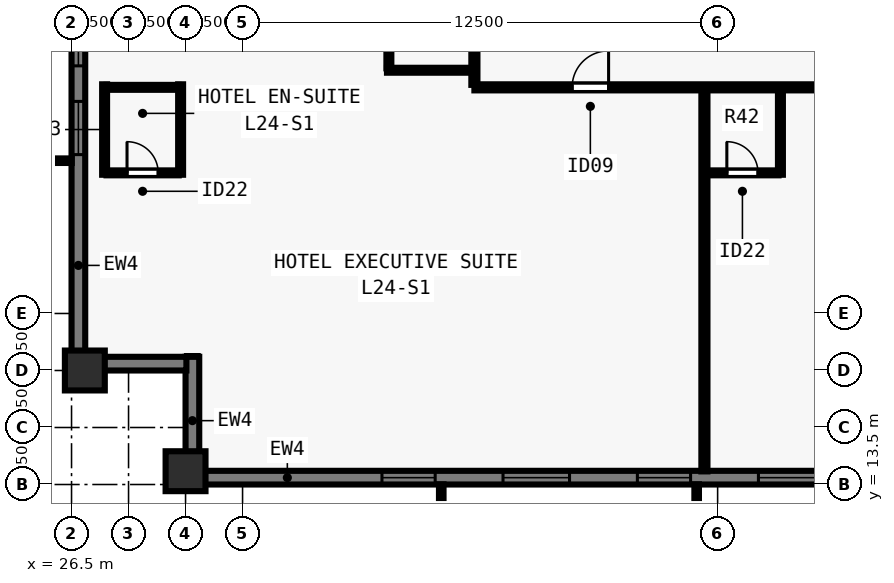
"""IFC4 building model, lengths in metres.
Left out: names, types, materials, properties, quantities, classifications, styles, units other than length and angle.
Written with IfcOpenShell. Run it as: python <this file> out.ifc"""

import sys

from ifc_helpers import new_model, si_unit, direction, frame, frame_2d, origin, origin_2d, place, context, subcontext, project, spatial, rectangle, extrude, element, fill, save


model = new_model("IFC4")
c1 = context("Model", 3, precision=1e-05, world=origin(), true_north=direction((0.0, 1.0)))
c2 = subcontext(c1, "Body", "Model", "MODEL_VIEW")
j1 = project(units=[si_unit("LENGTHUNIT", "METRE"), si_unit("PLANEANGLEUNIT", "RADIAN")], contexts=[c1])
p1 = place(None, origin())
s1 = spatial("IfcSite", under=j1, at=p1, CompositionType="ELEMENT")
p2 = place(p1, origin())
s2 = spatial("IfcBuilding", under=s1, at=p2, CompositionType="ELEMENT")
p3 = place(p2, frame((0.0, 0.0, 90.0)))
s3 = spatial("IfcBuildingStorey", under=s2, at=p3, CompositionType="ELEMENT", Elevation=90.0)
for number, where, z_axis, x_axis in (
    (1, (29.5, 13.85, 0.0), (0.0, 0.0, 1.0), (1.0, 0.0, 0.0)),
    (2, (26.85, 16.5, 0.0), (0.0, 0.0, 1.0), (0.0, 1.0, 0.0)),
):
    element("IfcColumn", number, at=place(p3, frame(where, z_axis=z_axis, x_axis=x_axis)), inside=s3, PredefinedType="COLUMN", context=c2, shape_type="SweptSolid", body=[
        extrude(rectangle(XDim=1.05, YDim=1.05, at=origin_2d()), origin(), (0.0, 0.0, 1.0), 3.5),
    ])
p4 = place(p3, frame((74.5, 13.68, 0.0), z_axis=(0.0, 0.0, 1.0), x_axis=(-1.0, 0.0, 0.0)))
e3 = element("IfcWall", 3, at=p4, inside=s3, PredefinedType="SOLIDWALL", context=c2, shape_type="SweptSolid", body=[
    extrude(rectangle(XDim=44.662, YDim=0.36, at=frame_2d((22.331, 0.0))), origin(), (0.0, 0.0, 1.0), 3.28),
])
p5 = place(p4, frame((4.83, 0.0, 0.8)))
e4 = element("IfcOpeningElement", 4, at=p5, cuts=e3, PredefinedType="OPENING", context=c2, shape_type="SweptSolid", body=[
    extrude(rectangle(XDim=1.4, YDim=1.544, at=frame_2d((0.7, 0.772))), frame((0.0, 0.19, 0.0), z_axis=(0.0, -1.0, 0.0), x_axis=(1.0, 0.0, 0.0)), (0.0, 0.0, 1.0), 0.38),
])
p6 = place(p4, frame((8.015, 0.0, 0.8)))
e5 = element("IfcOpeningElement", 5, at=p6, cuts=e3, PredefinedType="OPENING", context=c2, shape_type="SweptSolid", body=[
    extrude(rectangle(XDim=1.75, YDim=1.544, at=frame_2d((0.875, 0.772))), frame((0.0, 0.19, 0.0), z_axis=(0.0, -1.0, 0.0), x_axis=(1.0, 0.0, 0.0)), (0.0, 0.0, 1.0), 0.38),
])
p7 = place(p4, frame((11.551, 0.0, 0.8)))
e6 = element("IfcOpeningElement", 6, at=p7, cuts=e3, PredefinedType="OPENING", context=c2, shape_type="SweptSolid", body=[
    extrude(rectangle(XDim=1.4, YDim=1.544, at=frame_2d((0.7, 0.772))), frame((0.0, 0.19, 0.0), z_axis=(0.0, -1.0, 0.0), x_axis=(1.0, 0.0, 0.0)), (0.0, 0.0, 1.0), 0.38),
])
p8 = place(p4, frame((14.736, 0.0, 0.8)))
e7 = element("IfcOpeningElement", 7, at=p8, cuts=e3, PredefinedType="OPENING", context=c2, shape_type="SweptSolid", body=[
    extrude(rectangle(XDim=1.75, YDim=1.544, at=frame_2d((0.875, 0.772))), frame((0.0, 0.19, 0.0), z_axis=(0.0, -1.0, 0.0), x_axis=(1.0, 0.0, 0.0)), (0.0, 0.0, 1.0), 0.38),
])
p9 = place(p4, frame((18.721, 0.0, 0.8)))
e8 = element("IfcOpeningElement", 8, at=p9, cuts=e3, PredefinedType="OPENING", context=c2, shape_type="SweptSolid", body=[
    extrude(rectangle(XDim=1.4, YDim=1.544, at=frame_2d((0.7, 0.772))), frame((0.0, 0.19, 0.0), z_axis=(0.0, -1.0, 0.0), x_axis=(1.0, 0.0, 0.0)), (0.0, 0.0, 1.0), 0.38),
])
p10 = place(p4, frame((21.456, 0.0, 0.8)))
e9 = element("IfcOpeningElement", 9, at=p10, cuts=e3, PredefinedType="OPENING", context=c2, shape_type="SweptSolid", body=[
    extrude(rectangle(XDim=1.75, YDim=1.544, at=frame_2d((0.875, 0.772))), frame((0.0, 0.19, 0.0), z_axis=(0.0, -1.0, 0.0), x_axis=(1.0, 0.0, 0.0)), (0.0, 0.0, 1.0), 0.38),
])
p11 = place(p4, frame((24.991, 0.0, 0.8)))
e10 = element("IfcOpeningElement", 10, at=p11, cuts=e3, PredefinedType="OPENING", context=c2, shape_type="SweptSolid", body=[
    extrude(rectangle(XDim=1.4, YDim=1.544, at=frame_2d((0.7, 0.772))), frame((0.0, 0.19, 0.0), z_axis=(0.0, -1.0, 0.0), x_axis=(1.0, 0.0, 0.0)), (0.0, 0.0, 1.0), 0.38),
])
p12 = place(p4, frame((28.177, 0.0, 0.8)))
e11 = element("IfcOpeningElement", 11, at=p12, cuts=e3, PredefinedType="OPENING", context=c2, shape_type="SweptSolid", body=[
    extrude(rectangle(XDim=1.75, YDim=1.544, at=frame_2d((0.875, 0.772))), frame((0.0, 0.19, 0.0), z_axis=(0.0, -1.0, 0.0), x_axis=(1.0, 0.0, 0.0)), (0.0, 0.0, 1.0), 0.38),
])
p13 = place(p4, frame((31.711, 0.0, 0.8)))
e12 = element("IfcOpeningElement", 12, at=p13, cuts=e3, PredefinedType="OPENING", context=c2, shape_type="SweptSolid", body=[
    extrude(rectangle(XDim=1.4, YDim=1.544, at=frame_2d((0.7, 0.772))), frame((0.0, 0.19, 0.0), z_axis=(0.0, -1.0, 0.0), x_axis=(1.0, 0.0, 0.0)), (0.0, 0.0, 1.0), 0.38),
])
p14 = place(p4, frame((34.897, 0.0, 0.8)))
e13 = element("IfcOpeningElement", 13, at=p14, cuts=e3, PredefinedType="OPENING", context=c2, shape_type="SweptSolid", body=[
    extrude(rectangle(XDim=1.75, YDim=1.544, at=frame_2d((0.875, 0.772))), frame((0.0, 0.19, 0.0), z_axis=(0.0, -1.0, 0.0), x_axis=(1.0, 0.0, 0.0)), (0.0, 0.0, 1.0), 0.38),
])
p15 = place(p4, frame((38.432, 0.0, 0.8)))
e14 = element("IfcOpeningElement", 14, at=p15, cuts=e3, PredefinedType="OPENING", context=c2, shape_type="SweptSolid", body=[
    extrude(rectangle(XDim=1.4, YDim=1.544, at=frame_2d((0.7, 0.772))), frame((0.0, 0.19, 0.0), z_axis=(0.0, -1.0, 0.0), x_axis=(1.0, 0.0, 0.0)), (0.0, 0.0, 1.0), 0.38),
])
p16 = place(p3, frame((29.68, 13.5, 0.0), z_axis=(0.0, 0.0, 1.0), x_axis=(0.0, 1.0, 0.0)))
e15 = element("IfcWall", 15, at=p16, inside=s3, PredefinedType="SOLIDWALL", context=c2, shape_type="SweptSolid", body=[
    extrude(rectangle(XDim=3.36, YDim=0.36, at=frame_2d((1.68, 0.0))), origin(), (0.0, 0.0, 1.0), 3.28),
])
p17 = place(p3, frame((29.522, 16.68, 0.0), z_axis=(0.0, 0.0, 1.0), x_axis=(-1.0, 0.0, 0.0)))
e16 = element("IfcWall", 16, at=p17, inside=s3, PredefinedType="SOLIDWALL", context=c2, shape_type="SweptSolid", body=[
    extrude(rectangle(XDim=2.684, YDim=0.36, at=frame_2d((1.342, 0.0))), origin(), (0.0, 0.0, 1.0), 3.28),
])
p18 = place(p3, frame((26.68, 16.5, 0.0), z_axis=(0.0, 0.0, 1.0), x_axis=(0.0, 1.0, 0.0)))
e17 = element("IfcWall", 17, at=p18, inside=s3, PredefinedType="SOLIDWALL", context=c2, shape_type="SweptSolid", body=[
    extrude(rectangle(XDim=44.662, YDim=0.36, at=frame_2d((22.331, 0.0))), origin(), (0.0, 0.0, 1.0), 3.28),
])
p19 = place(p18, frame((5.68, 0.0, 0.8)))
e18 = element("IfcOpeningElement", 18, at=p19, cuts=e17, PredefinedType="OPENING", context=c2, shape_type="SweptSolid", body=[
    extrude(rectangle(XDim=1.4, YDim=1.544, at=frame_2d((0.7, 0.772))), frame((0.0, 0.19, 0.0), z_axis=(0.0, -1.0, 0.0), x_axis=(1.0, 0.0, 0.0)), (0.0, 0.0, 1.0), 0.38),
])
p20 = place(p18, frame((8.015, 0.0, 0.8)))
e19 = element("IfcOpeningElement", 19, at=p20, cuts=e17, PredefinedType="OPENING", context=c2, shape_type="SweptSolid", body=[
    extrude(rectangle(XDim=1.75, YDim=1.544, at=frame_2d((0.875, 0.772))), frame((0.0, 0.19, 0.0), z_axis=(0.0, -1.0, 0.0), x_axis=(1.0, 0.0, 0.0)), (0.0, 0.0, 1.0), 0.38),
])
p21 = place(p18, frame((11.551, 0.0, 0.8)))
e20 = element("IfcOpeningElement", 20, at=p21, cuts=e17, PredefinedType="OPENING", context=c2, shape_type="SweptSolid", body=[
    extrude(rectangle(XDim=1.4, YDim=1.544, at=frame_2d((0.7, 0.772))), frame((0.0, 0.19, 0.0), z_axis=(0.0, -1.0, 0.0), x_axis=(1.0, 0.0, 0.0)), (0.0, 0.0, 1.0), 0.38),
])
p22 = place(p18, frame((14.736, 0.0, 0.8)))
e21 = element("IfcOpeningElement", 21, at=p22, cuts=e17, PredefinedType="OPENING", context=c2, shape_type="SweptSolid", body=[
    extrude(rectangle(XDim=1.75, YDim=1.544, at=frame_2d((0.875, 0.772))), frame((0.0, 0.19, 0.0), z_axis=(0.0, -1.0, 0.0), x_axis=(1.0, 0.0, 0.0)), (0.0, 0.0, 1.0), 0.38),
])
p23 = place(p18, frame((18.721, 0.0, 0.8)))
e22 = element("IfcOpeningElement", 22, at=p23, cuts=e17, PredefinedType="OPENING", context=c2, shape_type="SweptSolid", body=[
    extrude(rectangle(XDim=1.4, YDim=1.544, at=frame_2d((0.7, 0.772))), frame((0.0, 0.19, 0.0), z_axis=(0.0, -1.0, 0.0), x_axis=(1.0, 0.0, 0.0)), (0.0, 0.0, 1.0), 0.38),
])
p24 = place(p18, frame((22.706, 0.0, 0.8)))
e23 = element("IfcOpeningElement", 23, at=p24, cuts=e17, PredefinedType="OPENING", context=c2, shape_type="SweptSolid", body=[
    extrude(rectangle(XDim=1.75, YDim=1.544, at=frame_2d((0.875, 0.772))), frame((0.0, 0.19, 0.0), z_axis=(0.0, -1.0, 0.0), x_axis=(1.0, 0.0, 0.0)), (0.0, 0.0, 1.0), 0.38),
])
p25 = place(p18, frame((24.991, 0.0, 0.8)))
e24 = element("IfcOpeningElement", 24, at=p25, cuts=e17, PredefinedType="OPENING", context=c2, shape_type="SweptSolid", body=[
    extrude(rectangle(XDim=1.4, YDim=1.544, at=frame_2d((0.7, 0.772))), frame((0.0, 0.19, 0.0), z_axis=(0.0, -1.0, 0.0), x_axis=(1.0, 0.0, 0.0)), (0.0, 0.0, 1.0), 0.38),
])
p26 = place(p18, frame((28.177, 0.0, 0.8)))
e25 = element("IfcOpeningElement", 25, at=p26, cuts=e17, PredefinedType="OPENING", context=c2, shape_type="SweptSolid", body=[
    extrude(rectangle(XDim=1.75, YDim=1.544, at=frame_2d((0.875, 0.772))), frame((0.0, 0.19, 0.0), z_axis=(0.0, -1.0, 0.0), x_axis=(1.0, 0.0, 0.0)), (0.0, 0.0, 1.0), 0.38),
])
p27 = place(p18, frame((31.711, 0.0, 0.8)))
e26 = element("IfcOpeningElement", 26, at=p27, cuts=e17, PredefinedType="OPENING", context=c2, shape_type="SweptSolid", body=[
    extrude(rectangle(XDim=1.4, YDim=1.544, at=frame_2d((0.7, 0.772))), frame((0.0, 0.19, 0.0), z_axis=(0.0, -1.0, 0.0), x_axis=(1.0, 0.0, 0.0)), (0.0, 0.0, 1.0), 0.38),
])
p28 = place(p18, frame((34.897, 0.0, 0.8)))
e27 = element("IfcOpeningElement", 27, at=p28, cuts=e17, PredefinedType="OPENING", context=c2, shape_type="SweptSolid", body=[
    extrude(rectangle(XDim=1.75, YDim=1.544, at=frame_2d((0.875, 0.772))), frame((0.0, 0.19, 0.0), z_axis=(0.0, -1.0, 0.0), x_axis=(1.0, 0.0, 0.0)), (0.0, 0.0, 1.0), 0.38),
])
p29 = place(p18, frame((37.982, 0.0, 0.8)))
e28 = element("IfcOpeningElement", 28, at=p29, cuts=e17, PredefinedType="OPENING", context=c2, shape_type="SweptSolid", body=[
    extrude(rectangle(XDim=1.4, YDim=1.544, at=frame_2d((0.7, 0.772))), frame((0.0, 0.19, 0.0), z_axis=(0.0, -1.0, 0.0), x_axis=(1.0, 0.0, 0.0)), (0.0, 0.0, 1.0), 0.38),
])
p30 = place(p3, frame((37.1, 23.95, 0.0), z_axis=(0.0, 0.0, 1.0), x_axis=(1.0, 0.0, 0.0)))
e29 = element("IfcWall", 29, at=p30, inside=s3, PredefinedType="PARTITIONING", context=c2, shape_type="SweptSolid", body=[
    extrude(rectangle(XDim=29.8, YDim=0.16, at=frame_2d((14.9, 0.0))), origin(), (0.0, 0.0, 1.0), 3.28),
])
p31 = place(p30, frame((2.571, 0.0, 0.0)))
e30 = element("IfcOpeningElement", 30, at=p31, cuts=e29, PredefinedType="OPENING", context=c2, shape_type="SweptSolid", body=[
    extrude(rectangle(XDim=0.96, YDim=2.15, at=frame_2d((0.48, 1.075))), frame((0.0, 0.09, 0.0), z_axis=(0.0, -1.0, 0.0), x_axis=(1.0, 0.0, 0.0)), (0.0, 0.0, 1.0), 0.18),
])
p32 = place(p30, frame((15.42, 0.0, 0.0)))
e31 = element("IfcOpeningElement", 31, at=p32, cuts=e29, PredefinedType="OPENING", context=c2, shape_type="SweptSolid", body=[
    extrude(rectangle(XDim=0.96, YDim=2.15, at=frame_2d((0.48, 1.075))), frame((0.0, 0.09, 0.0), z_axis=(0.0, -1.0, 0.0), x_axis=(1.0, 0.0, 0.0)), (0.0, 0.0, 1.0), 0.18),
])
p33 = place(p30, frame((27.269, 0.0, 0.0)))
e32 = element("IfcOpeningElement", 32, at=p33, cuts=e29, PredefinedType="OPENING", context=c2, shape_type="SweptSolid", body=[
    extrude(rectangle(XDim=0.96, YDim=2.15, at=frame_2d((0.48, 1.075))), frame((0.0, 0.09, 0.0), z_axis=(0.0, -1.0, 0.0), x_axis=(1.0, 0.0, 0.0)), (0.0, 0.0, 1.0), 0.18),
])
p34 = place(p3, frame((37.1, 24.015, 0.0), z_axis=(0.0, 0.0, 1.0), x_axis=(0.0, 1.0, 0.0)))
e33 = element("IfcWall", 33, at=p34, inside=s3, PredefinedType="PARTITIONING", context=c2, shape_type="SweptSolid", body=[
    extrude(rectangle(XDim=29.97, YDim=0.16, at=frame_2d((14.985, 0.0))), origin(), (0.0, 0.0, 1.0), 3.28),
])
p35 = place(p34, frame((8.134, 0.0, 0.0)))
e34 = element("IfcOpeningElement", 34, at=p35, cuts=e33, PredefinedType="OPENING", context=c2, shape_type="SweptSolid", body=[
    extrude(rectangle(XDim=0.96, YDim=2.15, at=frame_2d((0.48, 1.075))), frame((0.0, 0.09, 0.0), z_axis=(0.0, -1.0, 0.0), x_axis=(1.0, 0.0, 0.0)), (0.0, 0.0, 1.0), 0.18),
])
p36 = place(p34, frame((22.934, 0.0, 0.0)))
e35 = element("IfcOpeningElement", 35, at=p36, cuts=e33, PredefinedType="OPENING", context=c2, shape_type="SweptSolid", body=[
    extrude(rectangle(XDim=0.96, YDim=2.15, at=frame_2d((0.48, 1.075))), frame((0.0, 0.09, 0.0), z_axis=(0.0, -1.0, 0.0), x_axis=(1.0, 0.0, 0.0)), (0.0, 0.0, 1.0), 0.18),
])
for number, where, z_axis, x_axis in (
    (36, (27.37, 21.65, 0.0), (0.0, 0.0, 1.0), (0.0, 1.0, 0.0)),
    (37, (29.37, 21.65, 0.0), (0.0, 0.0, 1.0), (0.0, 1.0, 0.0)),
):
    element("IfcWall", number, at=place(p3, frame(where, z_axis=z_axis, x_axis=x_axis)), inside=s3, PredefinedType="PLUMBINGWALL", context=c2, shape_type="SweptSolid", body=[
        extrude(rectangle(XDim=2.38, YDim=0.13, at=frame_2d((1.19, 0.0))), origin(), (0.0, 0.0, 1.0), 3.28),
    ])
p37 = place(p3, frame((27.42, 21.7, 0.0), z_axis=(0.0, 0.0, 1.0), x_axis=(1.0, 0.0, 0.0)))
e38 = element("IfcWall", 38, at=p37, inside=s3, PredefinedType="PLUMBINGWALL", context=c2, shape_type="SweptSolid", body=[
    extrude(rectangle(XDim=1.9, YDim=0.13, at=frame_2d((0.95, 0.0))), origin(), (0.0, 0.0, 1.0), 3.28),
])
p38 = place(p37, frame((0.54, 0.0, 0.0)))
e39 = element("IfcOpeningElement", 39, at=p38, cuts=e38, PredefinedType="OPENING", context=c2, shape_type="SweptSolid", body=[
    extrude(rectangle(XDim=0.82, YDim=2.1, at=frame_2d((0.41, 1.05))), frame((0.0, 0.075, 0.0), z_axis=(0.0, -1.0, 0.0), x_axis=(1.0, 0.0, 0.0)), (0.0, 0.0, 1.0), 0.15),
])
p39 = place(p3, frame((27.42, 23.95, 0.0), z_axis=(0.0, 0.0, 1.0), x_axis=(1.0, 0.0, 0.0)))
e40 = element("IfcWall", 40, at=p39, inside=s3, PredefinedType="PLUMBINGWALL", context=c2, shape_type="SweptSolid", body=[
    extrude(rectangle(XDim=1.9, YDim=0.13, at=frame_2d((0.95, 0.0))), origin(), (0.0, 0.0, 1.0), 3.28),
])
p40 = place(p3, frame((43.153, 13.845, 0.0), z_axis=(0.0, 0.0, 1.0), x_axis=(0.0, 1.0, 0.0)))
e41 = element("IfcWall", 41, at=p40, inside=s3, PredefinedType="PARTITIONING", context=c2, shape_type="SweptSolid", body=[
    extrude(rectangle(XDim=10.04, YDim=0.16, at=frame_2d((5.02, 0.0))), origin(), (0.0, 0.0, 1.0), 3.28),
])
p41 = place(p3, frame((45.153, 21.65, 0.0), z_axis=(0.0, 0.0, 1.0), x_axis=(0.0, 1.0, 0.0)))
e42 = element("IfcWall", 42, at=p41, inside=s3, PredefinedType="PLUMBINGWALL", context=c2, shape_type="SweptSolid", body=[
    extrude(rectangle(XDim=2.235, YDim=0.13, at=frame_2d((1.118, 0.0))), origin(), (0.0, 0.0, 1.0), 3.28),
])
p42 = place(p3, frame((43.218, 21.7, 0.0), z_axis=(0.0, 0.0, 1.0), x_axis=(1.0, 0.0, 0.0)))
e43 = element("IfcWall", 43, at=p42, inside=s3, PredefinedType="PLUMBINGWALL", context=c2, shape_type="SweptSolid", body=[
    extrude(rectangle(XDim=1.885, YDim=0.13, at=frame_2d((0.942, 0.0))), origin(), (0.0, 0.0, 1.0), 3.28),
])
p43 = place(p42, frame((0.525, 0.0, 0.0)))
e44 = element("IfcOpeningElement", 44, at=p43, cuts=e43, PredefinedType="OPENING", context=c2, shape_type="SweptSolid", body=[
    extrude(rectangle(XDim=0.82, YDim=2.1, at=frame_2d((0.41, 1.05))), frame((0.0, 0.075, 0.0), z_axis=(0.0, -1.0, 0.0), x_axis=(1.0, 0.0, 0.0)), (0.0, 0.0, 1.0), 0.15),
])
p44 = place(p3, frame((34.8, 24.4, 0.0), z_axis=(0.0, 0.0, 1.0), x_axis=(1.0, 0.0, 0.0)))
e45 = element("IfcWall", 45, at=p44, inside=s3, PredefinedType="PLUMBINGWALL", context=c2, shape_type="SweptSolid", body=[
    extrude(rectangle(XDim=2.235, YDim=0.13, at=frame_2d((1.117, 0.0))), origin(), (0.0, 0.0, 1.0), 2.849),
])
p45 = place(p3, frame((34.85, 24.45, 0.0), z_axis=(0.0, 0.0, 1.0), x_axis=(0.0, 1.0, 0.0)))
e46 = element("IfcWall", 46, at=p45, inside=s3, PredefinedType="PLUMBINGWALL", context=c2, shape_type="SweptSolid", body=[
    extrude(rectangle(XDim=1.9, YDim=0.13, at=frame_2d((0.95, 0.0))), origin(), (0.0, 0.0, 1.0), 3.28),
])
p46 = place(p45, frame((0.54, 0.0, 0.0)))
e47 = element("IfcOpeningElement", 47, at=p46, cuts=e46, PredefinedType="OPENING", context=c2, shape_type="SweptSolid", body=[
    extrude(rectangle(XDim=0.82, YDim=2.1, at=frame_2d((0.41, 1.05))), frame((0.0, 0.075, 0.0), z_axis=(0.0, -1.0, 0.0), x_axis=(1.0, 0.0, 0.0)), (0.0, 0.0, 1.0), 0.15),
])
p47 = place(p12, origin())
e48 = element("IfcWindow", 48, at=p47, inside=s3, PartitioningType="SINGLE_PANEL", PredefinedType="WINDOW", context=c2, shape_type="SweptSolid", body=[
    extrude(rectangle(XDim=1.75, YDim=1.544, at=frame_2d((0.875, 0.772))), frame((0.0, -0.05, 0.0), z_axis=(0.0, -1.0, 0.0), x_axis=(1.0, 0.0, 0.0)), (0.0, 0.0, 1.0), 0.06),
])
fill(e11, e48)
p48 = place(p13, origin())
e49 = element("IfcWindow", 49, at=p48, inside=s3, PartitioningType="SINGLE_PANEL", PredefinedType="WINDOW", context=c2, shape_type="SweptSolid", body=[
    extrude(rectangle(XDim=1.4, YDim=1.544, at=frame_2d((0.7, 0.772))), frame((0.0, -0.05, 0.0), z_axis=(0.0, -1.0, 0.0), x_axis=(1.0, 0.0, 0.0)), (0.0, 0.0, 1.0), 0.06),
])
fill(e12, e49)
p49 = place(p14, origin())
e50 = element("IfcWindow", 50, at=p49, inside=s3, PartitioningType="SINGLE_PANEL", PredefinedType="WINDOW", context=c2, shape_type="SweptSolid", body=[
    extrude(rectangle(XDim=1.75, YDim=1.544, at=frame_2d((0.875, 0.772))), frame((0.0, -0.05, 0.0), z_axis=(0.0, -1.0, 0.0), x_axis=(1.0, 0.0, 0.0)), (0.0, 0.0, 1.0), 0.06),
])
fill(e13, e50)
p50 = place(p15, origin())
e51 = element("IfcWindow", 51, at=p50, inside=s3, PartitioningType="SINGLE_PANEL", PredefinedType="WINDOW", context=c2, shape_type="SweptSolid", body=[
    extrude(rectangle(XDim=1.4, YDim=1.544, at=frame_2d((0.7, 0.772))), frame((0.0, -0.05, 0.0), z_axis=(0.0, -1.0, 0.0), x_axis=(1.0, 0.0, 0.0)), (0.0, 0.0, 1.0), 0.06),
])
fill(e14, e51)
p51 = place(p19, origin())
e52 = element("IfcWindow", 52, at=p51, inside=s3, PartitioningType="SINGLE_PANEL", PredefinedType="WINDOW", context=c2, shape_type="SweptSolid", body=[
    extrude(rectangle(XDim=1.4, YDim=1.544, at=frame_2d((0.7, 0.772))), frame((0.0, -0.05, 0.0), z_axis=(0.0, -1.0, 0.0), x_axis=(1.0, 0.0, 0.0)), (0.0, 0.0, 1.0), 0.06),
])
fill(e18, e52)
p52 = place(p20, origin())
e53 = element("IfcWindow", 53, at=p52, inside=s3, PartitioningType="SINGLE_PANEL", PredefinedType="WINDOW", context=c2, shape_type="SweptSolid", body=[
    extrude(rectangle(XDim=1.75, YDim=1.544, at=frame_2d((0.875, 0.772))), frame((0.0, -0.05, 0.0), z_axis=(0.0, -1.0, 0.0), x_axis=(1.0, 0.0, 0.0)), (0.0, 0.0, 1.0), 0.06),
])
fill(e19, e53)
p53 = place(p38, origin())
e54 = element("IfcDoor", 54, at=p53, inside=s3, OperationType="SINGLE_SWING_LEFT", PredefinedType="DOOR", context=c2, shape_type="SweptSolid", body=[
    extrude(rectangle(XDim=0.82, YDim=2.1, at=frame_2d((0.41, 1.05))), frame((0.0, 0.025, 0.0), z_axis=(0.0, -1.0, 0.0), x_axis=(1.0, 0.0, 0.0)), (0.0, 0.0, 1.0), 0.05),
])
fill(e39, e54)
p54 = place(p31, origin())
e55 = element("IfcDoor", 55, at=p54, inside=s3, OperationType="SINGLE_SWING_RIGHT", PredefinedType="DOOR", context=c2, shape_type="SweptSolid", body=[
    extrude(rectangle(XDim=0.96, YDim=2.15, at=frame_2d((0.48, 1.075))), frame((0.0, 0.025, 0.0), z_axis=(0.0, -1.0, 0.0), x_axis=(1.0, 0.0, 0.0)), (0.0, 0.0, 1.0), 0.05),
])
fill(e30, e55)
p55 = place(p43, origin())
e56 = element("IfcDoor", 56, at=p55, inside=s3, OperationType="SINGLE_SWING_LEFT", PredefinedType="DOOR", context=c2, shape_type="SweptSolid", body=[
    extrude(rectangle(XDim=0.82, YDim=2.1, at=frame_2d((0.41, 1.05))), frame((0.0, 0.025, 0.0), z_axis=(0.0, -1.0, 0.0), x_axis=(1.0, 0.0, 0.0)), (0.0, 0.0, 1.0), 0.05),
])
fill(e44, e56)
save(model, sys.argv[1])
